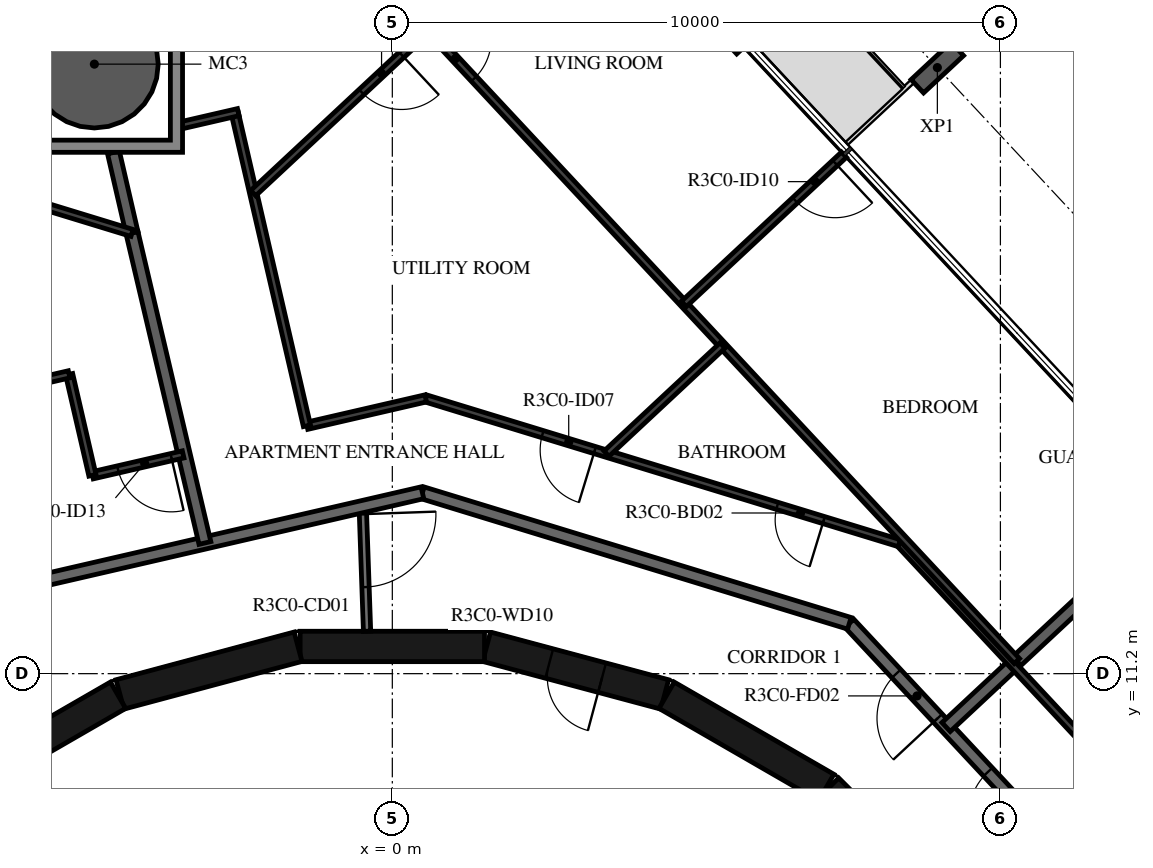
"""IFC4 building model, lengths in metres.
Left out: names, types, materials, properties, quantities, classifications, styles, units other than length and angle.
Written with IfcOpenShell. Run it as: python <this file> out.ifc"""

import sys

from ifc_helpers import new_model, si_unit, direction, frame, frame_2d, origin, origin_2d, place, context, subcontext, project, spatial, polyline, rectangle, hollow_circle, i_section, outline, extrude, element, fill, save


model = new_model("IFC4")
c1 = context("Model", 3, precision=1e-05, world=origin(), true_north=direction((0.0, 1.0)))
c2 = subcontext(c1, "Body", "Model", "MODEL_VIEW")
j1 = project(units=[si_unit("LENGTHUNIT", "METRE"), si_unit("PLANEANGLEUNIT", "RADIAN")], contexts=[c1])
p1 = place(None, origin())
s1 = spatial("IfcSite", under=j1, at=p1, CompositionType="ELEMENT")
p2 = place(p1, origin())
s2 = spatial("IfcBuilding", under=s1, at=p2, CompositionType="ELEMENT")
p3 = place(p2, frame((0.0, 0.0, 141.4)))
s3 = spatial("IfcBuildingStorey", under=s2, at=p3, CompositionType="ELEMENT", Elevation=141.4)
p4 = place(p3, frame((-4.9, 21.223, -0.38), z_axis=(0.0, 0.0, 1.0), x_axis=(1.0, 0.0, 0.0)))
e1 = element("IfcColumn", 1, at=p4, inside=s3, PredefinedType="COLUMN", context=c2, shape_type="SweptSolid", body=[
    extrude(hollow_circle(Radius=1.05, WallThickness=0.05, at=origin_2d()), origin(), (0.0, 0.0, 1.0), 2.576),
])
p5 = place(p3, frame((8.963, 21.167, -0.38), z_axis=(0.0, 0.0, 1.0), x_axis=(0.68199801865, -0.731354019992, 0.0)))
e2 = element("IfcColumn", 2, at=p5, inside=s3, PredefinedType="COLUMN", context=c2, shape_type="SweptSolid", body=[
    extrude(i_section(OverallWidth=0.3, OverallDepth=0.9, WebThickness=0.019, FlangeThickness=0.035, FilletRadius=0.03, at=origin_2d()), origin(), (0.0, 0.0, 1.0), 2.616),
])
p6 = place(p3, frame((5.722, 21.446, 0.0), z_axis=(0.0, 0.0, 1.0), x_axis=(-0.681994703002, 0.731357111866, 0.0)))
e3 = element("IfcWall", 3, at=p6, inside=s3, PredefinedType="STANDARD", context=c2, shape_type="SweptSolid", body=[
    extrude(rectangle(XDim=3.2, YDim=0.16, at=frame_2d((1.6, 0.0))), origin(), (0.0, 0.0, 1.0), 3.05),
])
p7 = place(p6, frame((0.4, 0.0, 0.0)))
e4 = element("IfcOpeningElement", 4, at=p7, cuts=e3, PredefinedType="OPENING", context=c2, shape_type="SweptSolid", body=[
    extrude(rectangle(XDim=2.4, YDim=2.4, at=frame_2d((1.2, 1.2))), frame((0.0, 0.09, 0.0), z_axis=(0.0, -1.0, 0.0), x_axis=(1.0, 0.0, 0.0)), (0.0, 0.0, 1.0), 0.18),
])
p8 = place(p3, frame((9.308, 7.164, 0.0), z_axis=(0.0, 0.0, 1.0), x_axis=(-0.707106781187, 0.707106781187, 0.0)))
e5 = element("IfcWall", 5, at=p8, inside=s3, PredefinedType="SHEAR", context=c2, shape_type="SweptSolid", body=[
    extrude(rectangle(XDim=3.032, YDim=0.5, at=frame_2d((1.516, 0.0))), origin(), (0.0, 0.0, 1.0), 3.05),
])
p9 = place(p8, frame((0.416, 0.0, 0.0)))
e6 = element("IfcOpeningElement", 6, at=p9, cuts=e5, PredefinedType="OPENING", context=c2, shape_type="SweptSolid", body=[
    extrude(rectangle(XDim=1.2, YDim=2.1, at=frame_2d((0.6, 1.05))), frame((0.0, 0.26, 0.0), z_axis=(0.0, -1.0, 0.0), x_axis=(1.0, 0.0, 0.0)), (0.0, 0.0, 1.0), 0.52),
])
p10 = place(p3, frame((7.137, 9.329, 0.0), z_axis=(0.0, 0.0, 1.0), x_axis=(-0.865975092491, 0.500087131594, 0.0)))
e7 = element("IfcWall", 7, at=p10, inside=s3, PredefinedType="SHEAR", context=c2, shape_type="SweptSolid", body=[
    extrude(rectangle(XDim=3.033, YDim=0.5, at=frame_2d((1.516, 0.0))), origin(), (0.0, 0.0, 1.0), 3.05),
])
p11 = place(p3, frame((4.479, 10.858, 0.0), z_axis=(0.0, 0.0, 1.0), x_axis=(-0.965948410781, 0.258734743916, 0.0)))
e8 = element("IfcWall", 8, at=p11, inside=s3, PredefinedType="SHEAR", context=c2, shape_type="SweptSolid", body=[
    extrude(rectangle(XDim=3.033, YDim=0.5, at=frame_2d((1.516, 0.0))), origin(), (0.0, 0.0, 1.0), 3.05),
])
p12 = place(p11, frame((1.066, 0.0, 0.0)))
e9 = element("IfcOpeningElement", 9, at=p12, cuts=e8, PredefinedType="OPENING", context=c2, shape_type="SweptSolid", body=[
    extrude(rectangle(XDim=0.9, YDim=2.1, at=frame_2d((0.45, 1.05))), frame((0.0, 0.26, 0.0), z_axis=(0.0, -1.0, 0.0), x_axis=(1.0, 0.0, 0.0)), (0.0, 0.0, 1.0), 0.52),
])
for number, where, z_axis, x_axis in (
    (10, (1.516, 11.647, 0.0), (0.0, 0.0, 1.0), (-1.0, 0.0, 0.0)),
    (11, (-1.55, 11.643, 0.0), (0.0, 0.0, 1.0), (-0.966, -0.259, 0.0)),
    (12, (-4.51, 10.845, 0.0), (0.0, 0.0, 1.0), (-0.866, -0.5, 0.0)),
):
    element("IfcWall", number, at=place(p3, frame(where, z_axis=z_axis, x_axis=x_axis)), inside=s3, PredefinedType="SHEAR", context=c2, shape_type="SweptSolid", body=[
        extrude(rectangle(XDim=3.033, YDim=0.5, at=frame_2d((1.516, 0.0))), origin(), (0.0, 0.0, 1.0), 3.05),
    ])
p13 = place(p3, frame((-0.487, 13.948, 0.0), z_axis=(0.0, 0.0, 1.0), x_axis=(0.034859752231, -0.999392214135, 0.0)))
e13 = element("IfcWall", 13, at=p13, inside=s3, PredefinedType="PARTITIONING", context=c2, shape_type="SweptSolid", body=[
    extrude(rectangle(XDim=2.052, YDim=0.12, at=frame_2d((1.026, 0.0))), origin(), (0.0, 0.0, 1.0), 3.05),
])
p14 = place(p13, frame((0.125, 0.0, 0.0)))
e14 = element("IfcOpeningElement", 14, at=p14, cuts=e13, PredefinedType="OPENING", context=c2, shape_type="SweptSolid", body=[
    extrude(rectangle(XDim=1.2, YDim=2.1, at=frame_2d((0.6, 1.05))), frame((0.0, 0.07, 0.0), z_axis=(0.0, -1.0, 0.0), x_axis=(1.0, 0.0, 0.0)), (0.0, 0.0, 1.0), 0.14),
])
p15 = place(p3, frame((12.523, 6.659, 0.0), z_axis=(0.0, 0.0, 1.0), x_axis=(-0.682001841105, 0.731350455479, 0.0)))
e15 = element("IfcWall", 15, at=p15, inside=s3, PredefinedType="STANDARD", context=c2, shape_type="SweptSolid", body=[
    extrude(rectangle(XDim=7.342, YDim=0.2, at=frame_2d((3.671, 0.0))), origin(), (0.0, 0.0, 1.0), 3.05),
])
p16 = place(p15, frame((3.0, 0.0, 0.0)))
e16 = element("IfcOpeningElement", 16, at=p16, cuts=e15, PredefinedType="OPENING", context=c2, shape_type="SweptSolid", body=[
    extrude(rectangle(XDim=1.0, YDim=2.1, at=frame_2d((0.5, 1.05))), frame((0.0, 0.11, 0.0), z_axis=(0.0, -1.0, 0.0), x_axis=(1.0, 0.0, 0.0)), (0.0, 0.0, 1.0), 0.22),
])
p17 = place(p15, frame((5.209, 0.0, 0.0)))
e17 = element("IfcOpeningElement", 17, at=p17, cuts=e15, PredefinedType="OPENING", context=c2, shape_type="SweptSolid", body=[
    extrude(rectangle(XDim=1.0, YDim=2.1, at=frame_2d((0.5, 1.05))), frame((0.0, 0.11, 0.0), z_axis=(0.0, -1.0, 0.0), x_axis=(1.0, 0.0, 0.0)), (0.0, 0.0, 1.0), 0.22),
])
p18 = place(p3, frame((7.516, 12.028, 0.0), z_axis=(0.0, 0.0, 1.0), x_axis=(-0.956306642771, 0.292365533182, 0.0)))
e18 = element("IfcWall", 18, at=p18, inside=s3, PredefinedType="STANDARD", context=c2, shape_type="SweptSolid", body=[
    extrude(rectangle(XDim=7.342, YDim=0.2, at=frame_2d((3.671, 0.0))), origin(), (0.0, 0.0, 1.0), 3.05),
])
p19 = place(p3, frame((0.495, 14.175, 0.0), z_axis=(0.0, 0.0, 1.0), x_axis=(-0.974376622151, -0.224922649383, 0.0)))
e19 = element("IfcWall", 19, at=p19, inside=s3, PredefinedType="STANDARD", context=c2, shape_type="SweptSolid", body=[
    extrude(rectangle(XDim=7.342, YDim=0.2, at=frame_2d((3.671, 0.0))), origin(), (0.0, 0.0, 1.0), 3.05),
])
p20 = place(p3, frame((10.233, 11.372, 0.0), z_axis=(0.0, 0.0, 1.0), x_axis=(-0.731329353292, -0.682024469513, 0.0)))
e20 = element("IfcWall", 20, at=p20, inside=s3, PredefinedType="STANDARD", context=c2, shape_type="SweptSolid", body=[
    extrude(rectangle(XDim=1.54, YDim=0.2, at=frame_2d((0.77, 0.0))), origin(), (0.0, 0.0, 1.0), 3.05),
])
p21 = place(p3, frame((12.903, 13.862, 0.0), z_axis=(0.0, 0.0, 1.0), x_axis=(-0.731328084739, -0.682025829769, 0.0)))
e21 = element("IfcWall", 21, at=p21, inside=s3, PredefinedType="STANDARD", context=c2, shape_type="SweptSolid", body=[
    extrude(rectangle(XDim=3.6, YDim=0.2, at=frame_2d((1.8, 0.0))), origin(), (0.0, 0.0, 1.0), 3.05),
])
p22 = place(p3, frame((-4.281, 18.448, 0.0), z_axis=(0.0, 0.0, 1.0), x_axis=(0.228867856942, -0.973457499873, 0.0)))
e22 = element("IfcWall", 22, at=p22, inside=s3, PredefinedType="STANDARD", context=c2, shape_type="SweptSolid", body=[
    extrude(rectangle(XDim=5.238, YDim=0.2, at=frame_2d((2.619, 0.0))), origin(), (0.0, 0.0, 1.0), 3.05),
])
p23 = place(p3, frame((-4.586, 19.771, 0.0), z_axis=(0.0, 0.0, 1.0), x_axis=(0.224898895484, -0.974382105136, 0.0)))
e23 = element("IfcWall", 23, at=p23, inside=s3, PredefinedType="STANDARD", context=c2, shape_type="SweptSolid", body=[
    extrude(rectangle(XDim=1.358, YDim=0.2, at=frame_2d((0.679, 0.0))), origin(), (0.0, 0.0, 1.0), 3.05),
])
p24 = place(p3, frame((13.894, 7.388, 0.0), z_axis=(0.0, 0.0, 1.0), x_axis=(-0.681994622729, 0.731357186721, 0.0)))
e24 = element("IfcWall", 24, at=p24, inside=s3, PredefinedType="PARTITIONING", context=c2, shape_type="SweptSolid", body=[
    extrude(rectangle(XDim=8.146, YDim=0.12, at=frame_2d((4.073, 0.0))), origin(), (0.0, 0.0, 1.0), 3.05),
])
p25 = place(p24, frame((0.2, 0.0, 0.0)))
e25 = element("IfcOpeningElement", 25, at=p25, cuts=e24, PredefinedType="OPENING", context=c2, shape_type="SweptSolid", body=[
    extrude(rectangle(XDim=0.9, YDim=2.1, at=frame_2d((0.45, 1.05))), frame((0.0, 0.07, 0.0), z_axis=(0.0, -1.0, 0.0), x_axis=(1.0, 0.0, 0.0)), (0.0, 0.0, 1.0), 0.14),
])
p26 = place(p3, frame((8.339, 13.345, 0.0), z_axis=(0.0, 0.0, 1.0), x_axis=(-0.956310145342, 0.292354076276, 0.0)))
e26 = element("IfcWall", 26, at=p26, inside=s3, PredefinedType="PARTITIONING", context=c2, shape_type="SweptSolid", body=[
    extrude(rectangle(XDim=8.146, YDim=0.12, at=frame_2d((4.073, 0.0))), origin(), (0.0, 0.0, 1.0), 3.05),
])
p27 = place(p26, frame((1.3, 0.0, 0.0)))
e27 = element("IfcOpeningElement", 27, at=p27, cuts=e26, PredefinedType="OPENING", context=c2, shape_type="SweptSolid", body=[
    extrude(rectangle(XDim=0.8, YDim=2.1, at=frame_2d((0.4, 1.05))), frame((0.0, 0.07, 0.0), z_axis=(0.0, -1.0, 0.0), x_axis=(1.0, 0.0, 0.0)), (0.0, 0.0, 1.0), 0.14),
])
p28 = place(p26, frame((5.237, 0.0, 0.0)))
e28 = element("IfcOpeningElement", 28, at=p28, cuts=e26, PredefinedType="OPENING", context=c2, shape_type="SweptSolid", body=[
    extrude(rectangle(XDim=0.9, YDim=2.1, at=frame_2d((0.45, 1.05))), frame((0.0, 0.07, 0.0), z_axis=(0.0, -1.0, 0.0), x_axis=(1.0, 0.0, 0.0)), (0.0, 0.0, 1.0), 0.14),
])
p29 = place(p3, frame((0.549, 15.727, 0.0), z_axis=(0.0, 0.0, 1.0), x_axis=(-0.97436861061, -0.224957352975, 0.0)))
e29 = element("IfcWall", 29, at=p29, inside=s3, PredefinedType="PARTITIONING", context=c2, shape_type="SweptSolid", body=[
    extrude(rectangle(XDim=2.004, YDim=0.12, at=frame_2d((1.002, 0.0))), origin(), (0.0, 0.0, 1.0), 3.05),
])
p30 = place(p3, frame((-1.404, 15.276, 0.0), z_axis=(0.0, 0.0, 1.0), x_axis=(-0.224947305813, 0.974370930194, 0.0)))
e30 = element("IfcWall", 30, at=p30, inside=s3, PredefinedType="PARTITIONING", context=c2, shape_type="SweptSolid", body=[
    extrude(rectangle(XDim=5.28, YDim=0.12, at=frame_2d((2.64, 0.0))), origin(), (0.0, 0.0, 1.0), 3.05),
])
p31 = place(p3, frame((-2.533, 20.434, 0.0), z_axis=(0.0, 0.0, 1.0), x_axis=(-0.974387124574, -0.224877147491, 0.0)))
e31 = element("IfcWall", 31, at=p31, inside=s3, PredefinedType="PARTITIONING", context=c2, shape_type="SweptSolid", body=[
    extrude(rectangle(XDim=1.011, YDim=0.12, at=frame_2d((0.505, 0.0))), origin(), (0.0, 0.0, 1.0), 3.05),
])
p32 = place(p3, frame((-1.539, 24.071, 0.0), z_axis=(0.0, 0.0, 1.0), x_axis=(0.68200220595, -0.731350115252, 0.0)))
e32 = element("IfcWall", 32, at=p32, inside=s3, PredefinedType="PARTITIONING", context=c2, shape_type="SweptSolid", body=[
    extrude(rectangle(XDim=17.316, YDim=0.12, at=frame_2d((8.658, 0.0))), origin(), (0.0, 0.0, 1.0), 3.05),
])
p33 = place(p32, frame((3.323, 0.0, 0.0)))
e33 = element("IfcOpeningElement", 33, at=p33, cuts=e32, PredefinedType="OPENING", context=c2, shape_type="SweptSolid", body=[
    extrude(rectangle(XDim=0.9, YDim=2.1, at=frame_2d((0.45, 1.05))), frame((0.0, 0.07, 0.0), z_axis=(0.0, -1.0, 0.0), x_axis=(1.0, 0.0, 0.0)), (0.0, 0.0, 1.0), 0.14),
])
p34 = place(p32, frame((0.2, 0.0, 0.0)))
e34 = element("IfcOpeningElement", 34, at=p34, cuts=e32, PredefinedType="OPENING", context=c2, shape_type="SweptSolid", body=[
    extrude(rectangle(XDim=0.9, YDim=2.1, at=frame_2d((0.45, 1.05))), frame((0.0, 0.07, 0.0), z_axis=(0.0, -1.0, 0.0), x_axis=(1.0, 0.0, 0.0)), (0.0, 0.0, 1.0), 0.14),
])
p35 = place(p3, frame((7.427, 19.734, 0.0), z_axis=(0.0, 0.0, 1.0), x_axis=(-0.73139345201, -0.681955730497, 0.0)))
e35 = element("IfcWall", 35, at=p35, inside=s3, PredefinedType="PARTITIONING", context=c2, shape_type="SweptSolid", body=[
    extrude(rectangle(XDim=3.6, YDim=0.12, at=frame_2d((1.8, 0.0))), origin(), (0.0, 0.0, 1.0), 3.05),
])
p36 = place(p35, frame((0.2, 0.0, 0.0)))
e36 = element("IfcOpeningElement", 36, at=p36, cuts=e35, PredefinedType="OPENING", context=c2, shape_type="SweptSolid", body=[
    extrude(rectangle(XDim=0.9, YDim=2.1, at=frame_2d((0.45, 1.05))), frame((0.0, 0.07, 0.0), z_axis=(0.0, -1.0, 0.0), x_axis=(1.0, 0.0, 0.0)), (0.0, 0.0, 1.0), 0.14),
])
p37 = place(p3, frame((5.431, 16.597, 0.0), z_axis=(0.0, 0.0, 1.0), x_axis=(-0.731378807316, -0.681971436505, 0.0)))
e37 = element("IfcWall", 37, at=p37, inside=s3, PredefinedType="PARTITIONING", context=c2, shape_type="SweptSolid", body=[
    extrude(rectangle(XDim=2.609, YDim=0.12, at=frame_2d((1.305, 0.0))), origin(), (0.0, 0.0, 1.0), 3.05),
])
p38 = place(p3, frame((0.591, 21.787, 0.0), z_axis=(0.0, 0.0, 1.0), x_axis=(-0.731364619453, -0.681986651931, 0.0)))
e38 = element("IfcWall", 38, at=p38, inside=s3, PredefinedType="PARTITIONING", context=c2, shape_type="SweptSolid", body=[
    extrude(rectangle(XDim=3.936, YDim=0.12, at=frame_2d((1.968, 0.0))), origin(), (0.0, 0.0, 1.0), 3.05),
])
p39 = place(p38, frame((0.6, 0.0, 0.0)))
e39 = element("IfcOpeningElement", 39, at=p39, cuts=e38, PredefinedType="OPENING", context=c2, shape_type="SweptSolid", body=[
    extrude(rectangle(XDim=0.9, YDim=2.1, at=frame_2d((0.45, 1.05))), frame((0.0, 0.07, 0.0), z_axis=(0.0, -1.0, 0.0), x_axis=(1.0, 0.0, 0.0)), (0.0, 0.0, 1.0), 0.14),
])
p40 = place(p3, frame((-3.44, 14.806, 0.0), z_axis=(0.0, 0.0, 1.0), x_axis=(-0.974356244071, -0.225010910046, 0.0)))
e40 = element("IfcWall", 40, at=p40, inside=s3, PredefinedType="PARTITIONING", context=c2, shape_type="SweptSolid", body=[
    extrude(rectangle(XDim=1.531, YDim=0.12, at=frame_2d((0.766, 0.0))), origin(), (0.0, 0.0, 1.0), 3.05),
])
p41 = place(p40, frame((0.2, 0.0, 0.0)))
e41 = element("IfcOpeningElement", 41, at=p41, cuts=e40, PredefinedType="OPENING", context=c2, shape_type="SweptSolid", body=[
    extrude(rectangle(XDim=0.9, YDim=2.1, at=frame_2d((0.45, 1.05))), frame((0.0, 0.07, 0.0), z_axis=(0.0, -1.0, 0.0), x_axis=(1.0, 0.0, 0.0)), (0.0, 0.0, 1.0), 0.14),
])
p42 = place(p3, frame((-4.931, 14.461, 0.0), z_axis=(0.0, 0.0, 1.0), x_axis=(-0.224911785629, 0.974379129849, 0.0)))
e42 = element("IfcWall", 42, at=p42, inside=s3, PredefinedType="PARTITIONING", context=c2, shape_type="SweptSolid", body=[
    extrude(rectangle(XDim=1.705, YDim=0.12, at=frame_2d((0.853, 0.0))), origin(), (0.0, 0.0, 1.0), 3.05),
])
p43 = place(p3, frame((-5.315, 16.123, 0.0), z_axis=(0.0, 0.0, 1.0), x_axis=(-0.974352456598, -0.225027310168, 0.0)))
e43 = element("IfcWall", 43, at=p43, inside=s3, PredefinedType="PARTITIONING", context=c2, shape_type="SweptSolid", body=[
    extrude(rectangle(XDim=1.7, YDim=0.12, at=frame_2d((0.85, 0.0))), origin(), (0.0, 0.0, 1.0), 3.05),
])
p44 = place(p3, frame((-9.066, 19.91, 0.0), z_axis=(0.0, 0.0, 1.0), x_axis=(0.956313309797, -0.292343724928, 0.0)))
e44 = element("IfcWall", 44, at=p44, inside=s3, PredefinedType="PARTITIONING", context=c2, shape_type="SweptSolid", body=[
    extrude(rectangle(XDim=5.004, YDim=0.12, at=frame_2d((2.502, 0.0))), origin(), (0.0, 0.0, 1.0), 3.05),
])
p45 = place(p44, frame((0.2, 0.0, 0.0)))
e45 = element("IfcOpeningElement", 45, at=p45, cuts=e44, PredefinedType="OPENING", context=c2, shape_type="SweptSolid", body=[
    extrude(rectangle(XDim=0.9, YDim=2.1, at=frame_2d((0.45, 1.05))), frame((0.0, 0.07, 0.0), z_axis=(0.0, -1.0, 0.0), x_axis=(1.0, 0.0, 0.0)), (0.0, 0.0, 1.0), 0.14),
])
p46 = place(p3, origin())
e46 = element("IfcWall", 46, at=p46, inside=s3, PredefinedType="STANDARD", context=c2, shape_type="SweptSolid", body=[
    extrude(outline(polyline([(-3.45, 22.674), (-3.45, 19.773), (-6.35, 19.773), (-6.35, 22.674), (-3.45, 22.674)]), holes=[polyline([(-6.15, 19.973), (-3.65, 19.973), (-3.65, 22.473), (-6.15, 22.473), (-6.15, 19.973)])]), origin(), (0.0, 0.0, 1.0), 3.05),
])
p47 = place(p12, origin())
e47 = element("IfcDoor", 47, at=p47, inside=s3, OperationType="SINGLE_SWING_LEFT", PredefinedType="DOOR", context=c2, shape_type="SweptSolid", body=[
    extrude(rectangle(XDim=0.9, YDim=2.1, at=frame_2d((0.45, 1.05))), frame((0.0, 0.025, 0.0), z_axis=(0.0, -1.0, 0.0), x_axis=(1.0, 0.0, 0.0)), (0.0, 0.0, 1.0), 0.05),
])
fill(e9, e47)
p48 = place(p16, origin())
e48 = element("IfcDoor", 48, at=p48, inside=s3, OperationType="SINGLE_SWING_LEFT", PredefinedType="DOOR", context=c2, shape_type="SweptSolid", body=[
    extrude(rectangle(XDim=1.0, YDim=2.1, at=frame_2d((0.5, 1.05))), frame((0.0, 0.025, 0.0), z_axis=(0.0, -1.0, 0.0), x_axis=(1.0, 0.0, 0.0)), (0.0, 0.0, 1.0), 0.05),
])
fill(e16, e48)
p49 = place(p17, origin())
e49 = element("IfcDoor", 49, at=p49, inside=s3, OperationType="SINGLE_SWING_RIGHT", PredefinedType="DOOR", context=c2, shape_type="SweptSolid", body=[
    extrude(rectangle(XDim=1.0, YDim=2.1, at=frame_2d((0.5, 1.05))), frame((0.0, 0.025, 0.0), z_axis=(0.0, -1.0, 0.0), x_axis=(1.0, 0.0, 0.0)), (0.0, 0.0, 1.0), 0.05),
])
fill(e17, e49)
p50 = place(p27, origin())
e50 = element("IfcDoor", 50, at=p50, inside=s3, OperationType="SINGLE_SWING_RIGHT", PredefinedType="DOOR", context=c2, shape_type="SweptSolid", body=[
    extrude(rectangle(XDim=0.8, YDim=2.1, at=frame_2d((0.4, 1.05))), frame((0.0, 0.025, 0.0), z_axis=(0.0, -1.0, 0.0), x_axis=(1.0, 0.0, 0.0)), (0.0, 0.0, 1.0), 0.05),
])
fill(e27, e50)
p51 = place(p28, origin())
e51 = element("IfcDoor", 51, at=p51, inside=s3, OperationType="SINGLE_SWING_RIGHT", PredefinedType="DOOR", context=c2, shape_type="SweptSolid", body=[
    extrude(rectangle(XDim=0.9, YDim=2.1, at=frame_2d((0.45, 1.05))), frame((0.0, 0.025, 0.0), z_axis=(0.0, -1.0, 0.0), x_axis=(1.0, 0.0, 0.0)), (0.0, 0.0, 1.0), 0.05),
])
fill(e28, e51)
p52 = place(p33, origin())
e52 = element("IfcDoor", 52, at=p52, inside=s3, OperationType="SINGLE_SWING_RIGHT", PredefinedType="DOOR", context=c2, shape_type="SweptSolid", body=[
    extrude(rectangle(XDim=0.9, YDim=2.1, at=frame_2d((0.45, 1.05))), frame((0.0, 0.025, 0.0), z_axis=(0.0, -1.0, 0.0), x_axis=(1.0, 0.0, 0.0)), (0.0, 0.0, 1.0), 0.05),
])
fill(e33, e52)
p53 = place(p39, origin())
e53 = element("IfcDoor", 53, at=p53, inside=s3, OperationType="SINGLE_SWING_RIGHT", PredefinedType="DOOR", context=c2, shape_type="SweptSolid", body=[
    extrude(rectangle(XDim=0.9, YDim=2.1, at=frame_2d((0.45, 1.05))), frame((0.0, 0.025, 0.0), z_axis=(0.0, -1.0, 0.0), x_axis=(1.0, 0.0, 0.0)), (0.0, 0.0, 1.0), 0.05),
])
fill(e39, e53)
p54 = place(p36, origin())
e54 = element("IfcDoor", 54, at=p54, inside=s3, OperationType="SINGLE_SWING_LEFT", PredefinedType="DOOR", context=c2, shape_type="SweptSolid", body=[
    extrude(rectangle(XDim=0.9, YDim=2.1, at=frame_2d((0.45, 1.05))), frame((0.0, 0.025, 0.0), z_axis=(0.0, -1.0, 0.0), x_axis=(1.0, 0.0, 0.0)), (0.0, 0.0, 1.0), 0.05),
])
fill(e36, e54)
p55 = place(p41, origin())
e55 = element("IfcDoor", 55, at=p55, inside=s3, OperationType="SINGLE_SWING_LEFT", PredefinedType="DOOR", context=c2, shape_type="SweptSolid", body=[
    extrude(rectangle(XDim=0.9, YDim=2.1, at=frame_2d((0.45, 1.05))), frame((0.0, 0.025, 0.0), z_axis=(0.0, -1.0, 0.0), x_axis=(1.0, 0.0, 0.0)), (0.0, 0.0, 1.0), 0.05),
])
fill(e41, e55)
p56 = place(p14, origin())
e56 = element("IfcDoor", 56, at=p56, inside=s3, OperationType="DOUBLE_DOOR_SINGLE_SWING", PredefinedType="DOOR", context=c2, shape_type="SweptSolid", body=[
    extrude(rectangle(XDim=1.2, YDim=2.1, at=frame_2d((0.6, 1.05))), frame((0.0, 0.025, 0.0), z_axis=(0.0, -1.0, 0.0), x_axis=(1.0, 0.0, 0.0)), (0.0, 0.0, 1.0), 0.05),
])
fill(e14, e56)
save(model, sys.argv[1])
